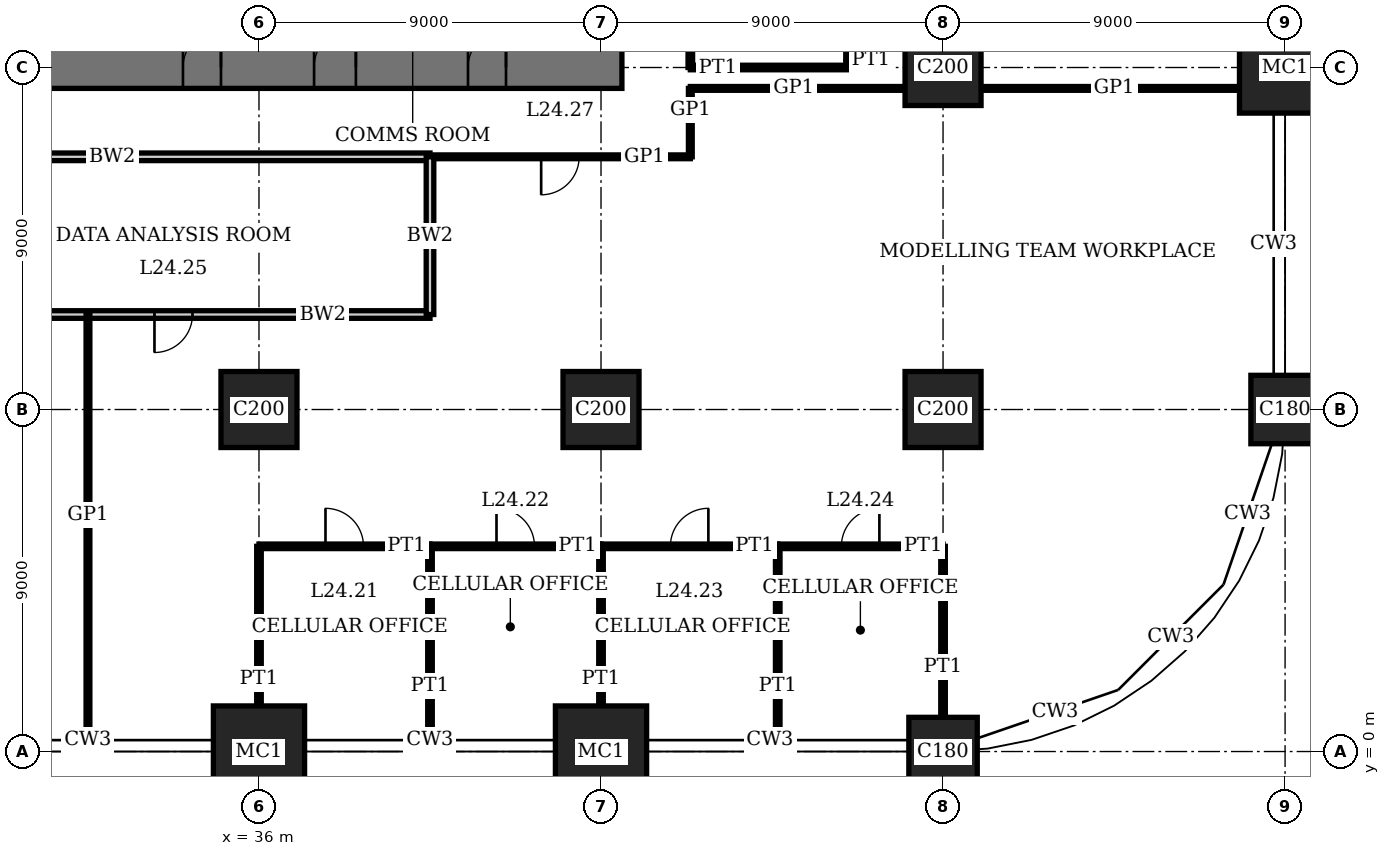
"""IFC4 building model, lengths in metres.
Left out: names, types, materials, properties, quantities, classifications, styles, units other than length and angle.
Written with IfcOpenShell. Run it as: python <this file> out.ifc"""

import sys

from ifc_helpers import new_model, si_unit, direction, frame, frame_2d, origin, origin_2d, place, context, subcontext, project, spatial, rectangle, extrude, element, fill, save


model = new_model("IFC4")
c1 = context("Model", 3, precision=1e-05, world=origin(), true_north=direction((0.0, 1.0)))
c2 = subcontext(c1, "Body", "Model", "MODEL_VIEW")
j1 = project(units=[si_unit("LENGTHUNIT", "METRE"), si_unit("PLANEANGLEUNIT", "RADIAN")], contexts=[c1])
p1 = place(None, origin())
s1 = spatial("IfcSite", under=j1, at=p1, CompositionType="ELEMENT")
p2 = place(p1, origin())
s2 = spatial("IfcBuilding", under=s1, at=p2, CompositionType="ELEMENT")
p3 = place(p2, frame((0.0, 0.0, 101.0)))
s3 = spatial("IfcBuildingStorey", under=s2, at=p3, CompositionType="ELEMENT", Elevation=101.0)
p4 = place(p3, frame((36.0, 0.0, 0.0), z_axis=(0.0, 0.0, 1.0), x_axis=(1.0, 0.0, 0.0)))
e1 = element("IfcColumn", 1, at=p4, inside=s3, PredefinedType="COLUMN", context=c2, shape_type="SweptSolid", body=[
    extrude(rectangle(XDim=2.4, YDim=2.4, at=origin_2d()), origin(), (0.0, 0.0, 1.0), 4.0),
])
p5 = place(p3, frame((36.0, 9.0, 0.0), z_axis=(0.0, 0.0, 1.0), x_axis=(1.0, 0.0, 0.0)))
e2 = element("IfcColumn", 2, at=p5, inside=s3, PredefinedType="COLUMN", context=c2, shape_type="SweptSolid", body=[
    extrude(rectangle(XDim=2.0, YDim=2.0, at=origin_2d()), origin(), (0.0, 0.0, 1.0), 4.0),
])
p6 = place(p3, frame((45.0, 0.0, 0.0), z_axis=(0.0, 0.0, 1.0), x_axis=(1.0, 0.0, 0.0)))
e3 = element("IfcColumn", 3, at=p6, inside=s3, PredefinedType="COLUMN", context=c2, shape_type="SweptSolid", body=[
    extrude(rectangle(XDim=2.4, YDim=2.4, at=origin_2d()), origin(), (0.0, 0.0, 1.0), 4.0),
])
p7 = place(p3, frame((45.0, 9.0, 0.0), z_axis=(0.0, 0.0, 1.0), x_axis=(1.0, 0.0, 0.0)))
e4 = element("IfcColumn", 4, at=p7, inside=s3, PredefinedType="COLUMN", context=c2, shape_type="SweptSolid", body=[
    extrude(rectangle(XDim=2.0, YDim=2.0, at=origin_2d()), origin(), (0.0, 0.0, 1.0), 4.0),
])
p8 = place(p3, frame((54.0, 0.0, 0.0), z_axis=(0.0, 0.0, 1.0), x_axis=(1.0, 0.0, 0.0)))
e5 = element("IfcColumn", 5, at=p8, inside=s3, PredefinedType="COLUMN", context=c2, shape_type="SweptSolid", body=[
    extrude(rectangle(XDim=1.8, YDim=1.8, at=origin_2d()), origin(), (0.0, 0.0, 1.0), 4.0),
])
for number, where, z_axis, x_axis in (
    (6, (54.0, 9.0, 0.0), (0.0, 0.0, 1.0), (1.0, 0.0, 0.0)),
    (7, (54.0, 18.0, 0.0), (0.0, 0.0, 1.0), (1.0, 0.0, 0.0)),
):
    element("IfcColumn", number, at=place(p3, frame(where, z_axis=z_axis, x_axis=x_axis)), inside=s3, PredefinedType="COLUMN", context=c2, shape_type="SweptSolid", body=[
        extrude(rectangle(XDim=2.0, YDim=2.0, at=origin_2d()), origin(), (0.0, 0.0, 1.0), 4.0),
    ])
p9 = place(p3, frame((63.0, 9.0, 0.0), z_axis=(0.0, 0.0, 1.0), x_axis=(1.0, 0.0, 0.0)))
e8 = element("IfcColumn", 8, at=p9, inside=s3, PredefinedType="COLUMN", context=c2, shape_type="SweptSolid", body=[
    extrude(rectangle(XDim=1.8, YDim=1.8, at=origin_2d()), origin(), (0.0, 0.0, 1.0), 4.0),
])
p10 = place(p3, frame((63.0, 18.0, 0.0), z_axis=(0.0, 0.0, 1.0), x_axis=(1.0, 0.0, 0.0)))
e9 = element("IfcColumn", 9, at=p10, inside=s3, PredefinedType="COLUMN", context=c2, shape_type="SweptSolid", body=[
    extrude(rectangle(XDim=2.4, YDim=2.4, at=origin_2d()), origin(), (0.0, 0.0, 1.0), 4.0),
])
p11 = place(p3, frame((17.45, 18.0, 0.0), z_axis=(0.0, 0.0, 1.0), x_axis=(1.0, 0.0, 0.0)))
e10 = element("IfcWall", 10, at=p11, inside=s3, PredefinedType="SHEAR", context=c2, shape_type="SweptSolid", body=[
    extrude(rectangle(XDim=28.1, YDim=1.1, at=frame_2d((14.05, 0.0))), origin(), (0.0, 0.0, 1.0), 4.0),
])
p12 = place(p11, frame((11.55, 0.0, 0.0)))
e11 = element("IfcOpeningElement", 11, at=p12, cuts=e10, PredefinedType="OPENING", context=c2, shape_type="SweptSolid", body=[
    extrude(rectangle(XDim=1.0, YDim=2.4, at=frame_2d((0.5, 1.2))), frame((0.0, 0.56, 0.0), z_axis=(0.0, -1.0, 0.0), x_axis=(1.0, 0.0, 0.0)), (0.0, 0.0, 1.0), 1.12),
])
p13 = place(p11, frame((16.55, 0.0, 0.0)))
e12 = element("IfcOpeningElement", 12, at=p13, cuts=e10, PredefinedType="OPENING", context=c2, shape_type="SweptSolid", body=[
    extrude(rectangle(XDim=1.0, YDim=2.4, at=frame_2d((0.5, 1.2))), frame((0.0, 0.56, 0.0), z_axis=(0.0, -1.0, 0.0), x_axis=(1.0, 0.0, 0.0)), (0.0, 0.0, 1.0), 1.12),
])
p14 = place(p11, frame((20.0, 0.0, 0.0)))
e13 = element("IfcOpeningElement", 13, at=p14, cuts=e10, PredefinedType="OPENING", context=c2, shape_type="SweptSolid", body=[
    extrude(rectangle(XDim=1.1, YDim=2.4, at=frame_2d((0.55, 1.2))), frame((0.0, 0.56, 0.0), z_axis=(0.0, -1.0, 0.0), x_axis=(1.0, 0.0, 0.0)), (0.0, 0.0, 1.0), 1.12),
])
p15 = place(p11, frame((24.05, 0.0, 0.0)))
e14 = element("IfcOpeningElement", 14, at=p15, cuts=e10, PredefinedType="OPENING", context=c2, shape_type="SweptSolid", body=[
    extrude(rectangle(XDim=1.0, YDim=2.4, at=frame_2d((0.5, 1.2))), frame((0.0, 0.56, 0.0), z_axis=(0.0, -1.0, 0.0), x_axis=(1.0, 0.0, 0.0)), (0.0, 0.0, 1.0), 1.12),
])
p16 = place(p3, frame((36.0, 5.4, 0.0), z_axis=(0.0, 0.0, 1.0), x_axis=(1.0, 0.0, 0.0)))
e15 = element("IfcWall", 15, at=p16, inside=s3, PredefinedType="PARTITIONING", context=c2, shape_type="SweptSolid", body=[
    extrude(rectangle(XDim=4.5, YDim=0.12, at=frame_2d((2.25, 0.0))), origin(), (0.0, 0.0, 1.0), 3.75),
])
p17 = place(p16, frame((1.75, 0.0, 0.0)))
e16 = element("IfcOpeningElement", 16, at=p17, cuts=e15, PredefinedType="OPENING", context=c2, shape_type="SweptSolid", body=[
    extrude(rectangle(XDim=1.0, YDim=2.4, at=frame_2d((0.5, 1.2))), frame((0.0, 0.07, 0.0), z_axis=(0.0, -1.0, 0.0), x_axis=(1.0, 0.0, 0.0)), (0.0, 0.0, 1.0), 0.14),
])
p18 = place(p3, frame((40.5, 5.4, 0.0), z_axis=(0.0, 0.0, 1.0), x_axis=(1.0, 0.0, 0.0)))
e17 = element("IfcWall", 17, at=p18, inside=s3, PredefinedType="PARTITIONING", context=c2, shape_type="SweptSolid", body=[
    extrude(rectangle(XDim=4.5, YDim=0.12, at=frame_2d((2.25, 0.0))), origin(), (0.0, 0.0, 1.0), 3.75),
])
p19 = place(p18, frame((1.75, 0.0, 0.0)))
e18 = element("IfcOpeningElement", 18, at=p19, cuts=e17, PredefinedType="OPENING", context=c2, shape_type="SweptSolid", body=[
    extrude(rectangle(XDim=1.0, YDim=2.4, at=frame_2d((0.5, 1.2))), frame((0.0, 0.07, 0.0), z_axis=(0.0, -1.0, 0.0), x_axis=(1.0, 0.0, 0.0)), (0.0, 0.0, 1.0), 0.14),
])
p20 = place(p3, frame((45.0, 5.4, 0.0), z_axis=(0.0, 0.0, 1.0), x_axis=(1.0, 0.0, 0.0)))
e19 = element("IfcWall", 19, at=p20, inside=s3, PredefinedType="PARTITIONING", context=c2, shape_type="SweptSolid", body=[
    extrude(rectangle(XDim=4.65, YDim=0.12, at=frame_2d((2.325, 0.0))), origin(), (0.0, 0.0, 1.0), 3.75),
])
p21 = place(p20, frame((1.825, 0.0, 0.0)))
e20 = element("IfcOpeningElement", 20, at=p21, cuts=e19, PredefinedType="OPENING", context=c2, shape_type="SweptSolid", body=[
    extrude(rectangle(XDim=1.0, YDim=2.4, at=frame_2d((0.5, 1.2))), frame((0.0, 0.07, 0.0), z_axis=(0.0, -1.0, 0.0), x_axis=(1.0, 0.0, 0.0)), (0.0, 0.0, 1.0), 0.14),
])
p22 = place(p3, frame((49.65, 5.4, 0.0), z_axis=(0.0, 0.0, 1.0), x_axis=(1.0, 0.0, 0.0)))
e21 = element("IfcWall", 21, at=p22, inside=s3, PredefinedType="PARTITIONING", context=c2, shape_type="SweptSolid", body=[
    extrude(rectangle(XDim=4.35, YDim=0.12, at=frame_2d((2.175, 0.0))), origin(), (0.0, 0.0, 1.0), 3.75),
])
p23 = place(p22, frame((1.675, 0.0, 0.0)))
e22 = element("IfcOpeningElement", 22, at=p23, cuts=e21, PredefinedType="OPENING", context=c2, shape_type="SweptSolid", body=[
    extrude(rectangle(XDim=1.0, YDim=2.4, at=frame_2d((0.5, 1.2))), frame((0.0, 0.07, 0.0), z_axis=(0.0, -1.0, 0.0), x_axis=(1.0, 0.0, 0.0)), (0.0, 0.0, 1.0), 0.14),
])
p24 = place(p3, frame((27.0, 11.5, 0.0), z_axis=(0.0, 0.0, 1.0), x_axis=(1.0, 0.0, 0.0)))
e23 = element("IfcWall", 23, at=p24, inside=s3, PredefinedType="SOLIDWALL", context=c2, shape_type="SweptSolid", body=[
    extrude(rectangle(XDim=13.5, YDim=0.2, at=frame_2d((6.75, 0.0))), origin(), (0.0, 0.0, 1.0), 3.75),
])
p25 = place(p24, frame((6.25, 0.0, 0.0)))
e24 = element("IfcOpeningElement", 24, at=p25, cuts=e23, PredefinedType="OPENING", context=c2, shape_type="SweptSolid", body=[
    extrude(rectangle(XDim=1.0, YDim=2.4, at=frame_2d((0.5, 1.2))), frame((0.0, 0.11, 0.0), z_axis=(0.0, -1.0, 0.0), x_axis=(1.0, 0.0, 0.0)), (0.0, 0.0, 1.0), 0.22),
])
p26 = place(p3, frame((27.0, 15.65, 0.0), z_axis=(0.0, 0.0, 1.0), x_axis=(1.0, 0.0, 0.0)))
e25 = element("IfcWall", 25, at=p26, inside=s3, PredefinedType="SOLIDWALL", context=c2, shape_type="SweptSolid", body=[
    extrude(rectangle(XDim=13.5, YDim=0.2, at=frame_2d((6.75, 0.0))), origin(), (0.0, 0.0, 1.0), 3.75),
])
p27 = place(p3, frame((40.5, 15.65, 0.0), z_axis=(0.0, 0.0, 1.0), x_axis=(1.0, 0.0, 0.0)))
e26 = element("IfcWall", 26, at=p27, inside=s3, PredefinedType="PARTITIONING", context=c2, shape_type="SweptSolid", body=[
    extrude(rectangle(XDim=6.85, YDim=0.1, at=frame_2d((3.425, 0.0))), origin(), (0.0, 0.0, 1.0), 3.75),
])
p28 = place(p27, frame((2.925, 0.0, 0.0)))
e27 = element("IfcOpeningElement", 27, at=p28, cuts=e26, PredefinedType="OPENING", context=c2, shape_type="SweptSolid", body=[
    extrude(rectangle(XDim=1.0, YDim=2.4, at=frame_2d((0.5, 1.2))), frame((0.0, 0.06, 0.0), z_axis=(0.0, -1.0, 0.0), x_axis=(1.0, 0.0, 0.0)), (0.0, 0.0, 1.0), 0.12),
])
p29 = place(p3, frame((47.35, 17.45, 0.0), z_axis=(0.0, 0.0, 1.0), x_axis=(1.0, 0.0, 0.0)))
e28 = element("IfcWall", 28, at=p29, inside=s3, PredefinedType="PARTITIONING", context=c2, shape_type="SweptSolid", body=[
    extrude(rectangle(XDim=5.65, YDim=0.1, at=frame_2d((2.825, 0.0))), origin(), (0.0, 0.0, 1.0), 3.75),
])
p30 = place(p3, frame((55.0, 17.45, 0.0), z_axis=(0.0, 0.0, 1.0), x_axis=(1.0, 0.0, 0.0)))
e29 = element("IfcWall", 29, at=p30, inside=s3, PredefinedType="PARTITIONING", context=c2, shape_type="SweptSolid", body=[
    extrude(rectangle(XDim=6.8, YDim=0.1, at=frame_2d((3.4, 0.0))), origin(), (0.0, 0.0, 1.0), 3.75),
])
p31 = place(p3, frame((47.35, 18.0, 0.0), z_axis=(0.0, 0.0, 1.0), x_axis=(1.0, 0.0, 0.0)))
e30 = element("IfcWall", 30, at=p31, inside=s3, PredefinedType="PARTITIONING", context=c2, shape_type="SweptSolid", body=[
    extrude(rectangle(XDim=4.15, YDim=0.12, at=frame_2d((2.075, 0.0))), origin(), (0.0, 0.0, 1.0), 3.05),
])
p32 = place(p3, frame((31.5, 0.31, 0.0), z_axis=(0.0, 0.0, 1.0), x_axis=(0.0, 1.0, 0.0)))
e31 = element("IfcWall", 31, at=p32, inside=s3, PredefinedType="PARTITIONING", context=c2, shape_type="SweptSolid", body=[
    extrude(rectangle(XDim=11.2, YDim=0.1, at=frame_2d((5.6, 0.0))), origin(), (0.0, 0.0, 1.0), 3.75),
])
p33 = place(p3, frame((36.0, 1.2, 0.0), z_axis=(0.0, 0.0, 1.0), x_axis=(0.0, 1.0, 0.0)))
e32 = element("IfcWall", 32, at=p33, inside=s3, PredefinedType="PARTITIONING", context=c2, shape_type="SweptSolid", body=[
    extrude(rectangle(XDim=4.2, YDim=0.12, at=frame_2d((2.1, 0.0))), origin(), (0.0, 0.0, 1.0), 3.05),
])
p34 = place(p3, frame((40.5, 11.5, 0.0), z_axis=(0.0, 0.0, 1.0), x_axis=(0.0, 1.0, 0.0)))
e33 = element("IfcWall", 33, at=p34, inside=s3, PredefinedType="SOLIDWALL", context=c2, shape_type="SweptSolid", body=[
    extrude(rectangle(XDim=4.15, YDim=0.2, at=frame_2d((2.075, 0.0))), origin(), (0.0, 0.0, 1.0), 3.75),
])
p35 = place(p3, frame((40.5, 0.31, 0.0), z_axis=(0.0, 0.0, 1.0), x_axis=(0.0, 1.0, 0.0)))
e34 = element("IfcWall", 34, at=p35, inside=s3, PredefinedType="PARTITIONING", context=c2, shape_type="SweptSolid", body=[
    extrude(rectangle(XDim=5.09, YDim=0.12, at=frame_2d((2.545, 0.0))), origin(), (0.0, 0.0, 1.0), 3.75),
])
p36 = place(p3, frame((45.0, 1.2, 0.0), z_axis=(0.0, 0.0, 1.0), x_axis=(0.0, 1.0, 0.0)))
e35 = element("IfcWall", 35, at=p36, inside=s3, PredefinedType="PARTITIONING", context=c2, shape_type="SweptSolid", body=[
    extrude(rectangle(XDim=4.2, YDim=0.12, at=frame_2d((2.1, 0.0))), origin(), (0.0, 0.0, 1.0), 3.05),
])
p37 = place(p3, frame((47.35, 18.0, 0.0), z_axis=(0.0, 0.0, 1.0), x_axis=(0.0, 1.0, 0.0)))
e36 = element("IfcWall", 36, at=p37, inside=s3, PredefinedType="PARTITIONING", context=c2, shape_type="SweptSolid", body=[
    extrude(rectangle(XDim=4.5, YDim=0.12, at=frame_2d((2.25, 0.0))), origin(), (0.0, 0.0, 1.0), 3.75),
])
p38 = place(p3, frame((47.35, 15.65, 0.0), z_axis=(0.0, 0.0, 1.0), x_axis=(0.0, 1.0, 0.0)))
e37 = element("IfcWall", 37, at=p38, inside=s3, PredefinedType="PARTITIONING", context=c2, shape_type="SweptSolid", body=[
    extrude(rectangle(XDim=1.8, YDim=0.1, at=frame_2d((0.9, 0.0))), origin(), (0.0, 0.0, 1.0), 3.75),
])
p39 = place(p3, frame((49.65, 0.31, 0.0), z_axis=(0.0, 0.0, 1.0), x_axis=(0.0, 1.0, 0.0)))
e38 = element("IfcWall", 38, at=p39, inside=s3, PredefinedType="PARTITIONING", context=c2, shape_type="SweptSolid", body=[
    extrude(rectangle(XDim=5.09, YDim=0.12, at=frame_2d((2.545, 0.0))), origin(), (0.0, 0.0, 1.0), 3.75),
])
p40 = place(p3, frame((51.5, 18.0, 0.0), z_axis=(0.0, 0.0, 1.0), x_axis=(0.0, 1.0, 0.0)))
e39 = element("IfcWall", 39, at=p40, inside=s3, PredefinedType="PARTITIONING", context=c2, shape_type="SweptSolid", body=[
    extrude(rectangle(XDim=4.5, YDim=0.12, at=frame_2d((2.25, 0.0))), origin(), (0.0, 0.0, 1.0), 3.75),
])
p41 = place(p40, frame((1.75, 0.0, 0.0)))
e40 = element("IfcOpeningElement", 40, at=p41, cuts=e39, PredefinedType="OPENING", context=c2, shape_type="SweptSolid", body=[
    extrude(rectangle(XDim=1.0, YDim=2.4, at=frame_2d((0.5, 1.2))), frame((0.0, 0.07, 0.0), z_axis=(0.0, -1.0, 0.0), x_axis=(1.0, 0.0, 0.0)), (0.0, 0.0, 1.0), 0.14),
])
p42 = place(p3, frame((54.0, 0.9, 0.0), z_axis=(0.0, 0.0, 1.0), x_axis=(0.0, 1.0, 0.0)))
e41 = element("IfcWall", 41, at=p42, inside=s3, PredefinedType="PARTITIONING", context=c2, shape_type="SweptSolid", body=[
    extrude(rectangle(XDim=4.5, YDim=0.12, at=frame_2d((2.25, 0.0))), origin(), (0.0, 0.0, 1.0), 3.05),
])
p43 = place(p13, origin())
e42 = element("IfcDoor", 42, at=p43, inside=s3, OperationType="SINGLE_SWING_LEFT", PredefinedType="DOOR", context=c2, shape_type="SweptSolid", body=[
    extrude(rectangle(XDim=1.0, YDim=2.4, at=frame_2d((0.5, 1.2))), frame((0.0, 0.025, 0.0), z_axis=(0.0, -1.0, 0.0), x_axis=(1.0, 0.0, 0.0)), (0.0, 0.0, 1.0), 0.05),
    extrude(rectangle(XDim=0.04, YDim=2.4, at=frame_2d((0.02, 1.2))), frame((0.0, 0.4, 0.0), z_axis=(0.0, -1.0, 0.0), x_axis=(1.0, 0.0, 0.0)), (0.0, 0.0, 1.0), 0.8),
    extrude(rectangle(XDim=0.04, YDim=2.4, at=frame_2d((0.98, 1.2))), frame((0.0, 0.4, 0.0), z_axis=(0.0, -1.0, 0.0), x_axis=(1.0, 0.0, 0.0)), (0.0, 0.0, 1.0), 0.8),
    extrude(rectangle(XDim=1.0, YDim=0.04, at=frame_2d((0.5, 2.38))), frame((0.0, 0.4, 0.0), z_axis=(0.0, -1.0, 0.0), x_axis=(1.0, 0.0, 0.0)), (0.0, 0.0, 1.0), 0.8),
])
fill(e12, e42)
p44 = place(p14, origin())
e43 = element("IfcDoor", 43, at=p44, inside=s3, OperationType="SINGLE_SWING_LEFT", PredefinedType="DOOR", context=c2, shape_type="SweptSolid", body=[
    extrude(rectangle(XDim=1.1, YDim=2.4, at=frame_2d((0.55, 1.2))), frame((0.0, 0.025, 0.0), z_axis=(0.0, -1.0, 0.0), x_axis=(1.0, 0.0, 0.0)), (0.0, 0.0, 1.0), 0.05),
    extrude(rectangle(XDim=0.04, YDim=2.4, at=frame_2d((0.02, 1.2))), frame((0.0, 0.44, 0.0), z_axis=(0.0, -1.0, 0.0), x_axis=(1.0, 0.0, 0.0)), (0.0, 0.0, 1.0), 0.88),
    extrude(rectangle(XDim=0.04, YDim=2.4, at=frame_2d((1.08, 1.2))), frame((0.0, 0.44, 0.0), z_axis=(0.0, -1.0, 0.0), x_axis=(1.0, 0.0, 0.0)), (0.0, 0.0, 1.0), 0.88),
    extrude(rectangle(XDim=1.1, YDim=0.04, at=frame_2d((0.55, 2.38))), frame((0.0, 0.44, 0.0), z_axis=(0.0, -1.0, 0.0), x_axis=(1.0, 0.0, 0.0)), (0.0, 0.0, 1.0), 0.88),
])
fill(e13, e43)
p45 = place(p15, origin())
e44 = element("IfcDoor", 44, at=p45, inside=s3, OperationType="SINGLE_SWING_LEFT", PredefinedType="DOOR", context=c2, shape_type="SweptSolid", body=[
    extrude(rectangle(XDim=1.0, YDim=2.4, at=frame_2d((0.5, 1.2))), frame((0.0, 0.025, 0.0), z_axis=(0.0, -1.0, 0.0), x_axis=(1.0, 0.0, 0.0)), (0.0, 0.0, 1.0), 0.05),
    extrude(rectangle(XDim=0.04, YDim=2.4, at=frame_2d((0.02, 1.2))), frame((0.0, 0.4, 0.0), z_axis=(0.0, -1.0, 0.0), x_axis=(1.0, 0.0, 0.0)), (0.0, 0.0, 1.0), 0.8),
    extrude(rectangle(XDim=0.04, YDim=2.4, at=frame_2d((0.98, 1.2))), frame((0.0, 0.4, 0.0), z_axis=(0.0, -1.0, 0.0), x_axis=(1.0, 0.0, 0.0)), (0.0, 0.0, 1.0), 0.8),
    extrude(rectangle(XDim=1.0, YDim=0.04, at=frame_2d((0.5, 2.38))), frame((0.0, 0.4, 0.0), z_axis=(0.0, -1.0, 0.0), x_axis=(1.0, 0.0, 0.0)), (0.0, 0.0, 1.0), 0.8),
])
fill(e14, e44)
p46 = place(p17, origin())
e45 = element("IfcDoor", 45, at=p46, inside=s3, OperationType="SINGLE_SWING_RIGHT", PredefinedType="DOOR", context=c2, shape_type="SweptSolid", body=[
    extrude(rectangle(XDim=1.0, YDim=2.4, at=frame_2d((0.5, 1.2))), frame((0.0, 0.025, 0.0), z_axis=(0.0, -1.0, 0.0), x_axis=(1.0, 0.0, 0.0)), (0.0, 0.0, 1.0), 0.05),
])
fill(e16, e45)
p47 = place(p19, origin())
e46 = element("IfcDoor", 46, at=p47, inside=s3, OperationType="SINGLE_SWING_RIGHT", PredefinedType="DOOR", context=c2, shape_type="SweptSolid", body=[
    extrude(rectangle(XDim=1.0, YDim=2.4, at=frame_2d((0.5, 1.2))), frame((0.0, 0.025, 0.0), z_axis=(0.0, -1.0, 0.0), x_axis=(1.0, 0.0, 0.0)), (0.0, 0.0, 1.0), 0.05),
])
fill(e18, e46)
p48 = place(p21, origin())
e47 = element("IfcDoor", 47, at=p48, inside=s3, OperationType="SINGLE_SWING_LEFT", PredefinedType="DOOR", context=c2, shape_type="SweptSolid", body=[
    extrude(rectangle(XDim=1.0, YDim=2.4, at=frame_2d((0.5, 1.2))), frame((0.0, 0.025, 0.0), z_axis=(0.0, -1.0, 0.0), x_axis=(1.0, 0.0, 0.0)), (0.0, 0.0, 1.0), 0.05),
])
fill(e20, e47)
p49 = place(p23, origin())
e48 = element("IfcDoor", 48, at=p49, inside=s3, OperationType="SINGLE_SWING_LEFT", PredefinedType="DOOR", context=c2, shape_type="SweptSolid", body=[
    extrude(rectangle(XDim=1.0, YDim=2.4, at=frame_2d((0.5, 1.2))), frame((0.0, 0.025, 0.0), z_axis=(0.0, -1.0, 0.0), x_axis=(1.0, 0.0, 0.0)), (0.0, 0.0, 1.0), 0.05),
])
fill(e22, e48)
p50 = place(p25, origin())
e49 = element("IfcDoor", 49, at=p50, inside=s3, OperationType="SINGLE_SWING_LEFT", PredefinedType="DOOR", context=c2, shape_type="SweptSolid", body=[
    extrude(rectangle(XDim=1.0, YDim=2.4, at=frame_2d((0.5, 1.2))), frame((0.0, 0.035, 0.0), z_axis=(0.0, -1.0, 0.0), x_axis=(1.0, 0.0, 0.0)), (0.0, 0.0, 1.0), 0.07),
])
fill(e24, e49)
p51 = place(p28, origin())
e50 = element("IfcDoor", 50, at=p51, inside=s3, OperationType="SINGLE_SWING_LEFT", PredefinedType="DOOR", context=c2, shape_type="SweptSolid", body=[
    extrude(rectangle(XDim=1.0, YDim=2.4, at=frame_2d((0.5, 1.2))), frame((0.0, 0.02, 0.0), z_axis=(0.0, -1.0, 0.0), x_axis=(1.0, 0.0, 0.0)), (0.0, 0.0, 1.0), 0.04),
])
fill(e27, e50)
save(model, sys.argv[1])
